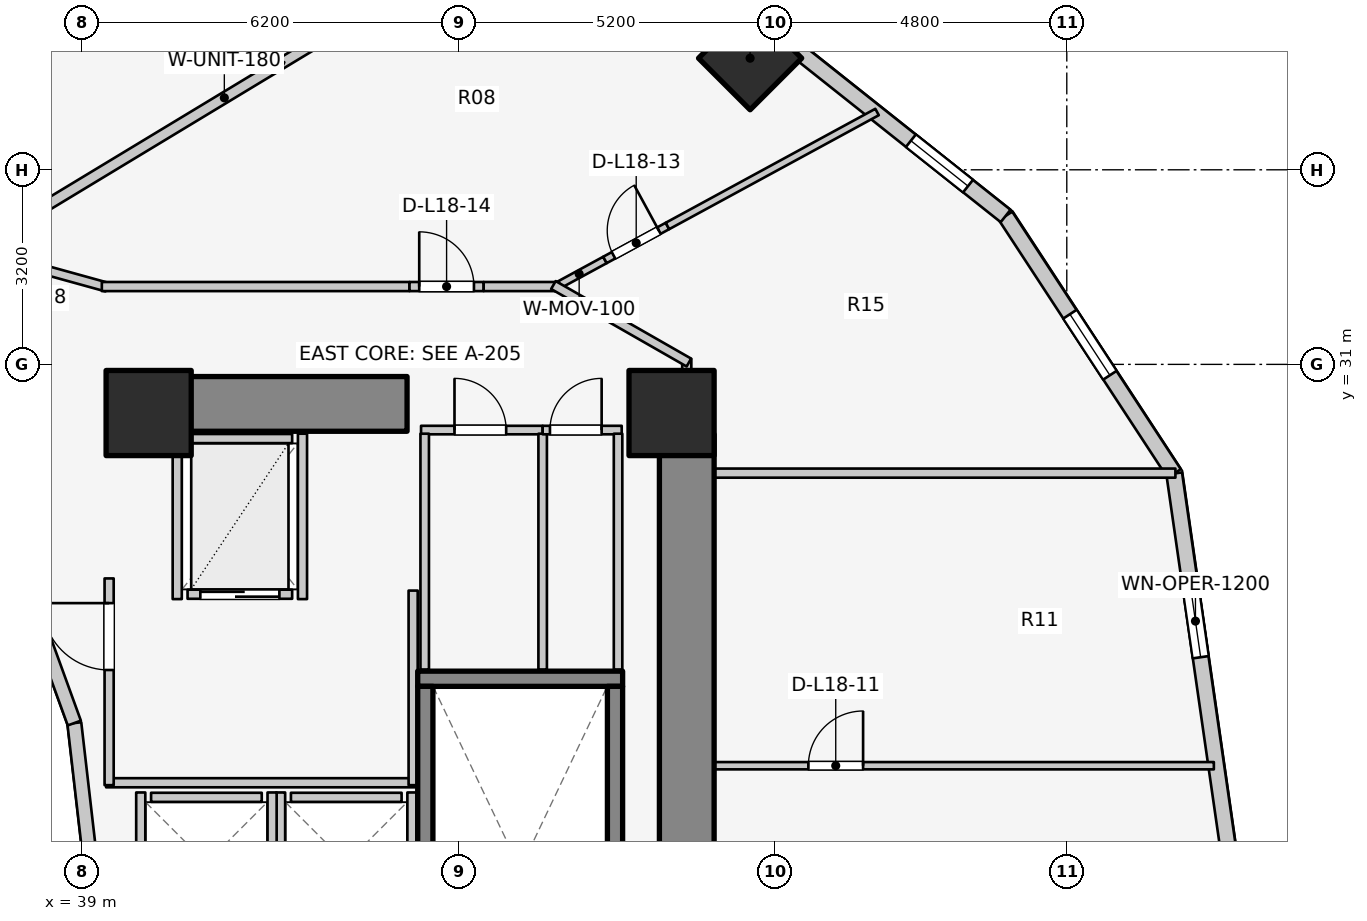
"""IFC4 building model, lengths in metres.
Left out: names, types, materials, properties, quantities, classifications, styles, units other than length and angle.
Written with IfcOpenShell. Run it as: python <this file> out.ifc"""

import sys

from ifc_helpers import new_model, si_unit, direction, frame, frame_2d, origin, origin_2d, place, context, subcontext, project, spatial, rectangle, extrude, element, fill, save


model = new_model("IFC4")
c1 = context("Model", 3, precision=1e-05, world=origin(), true_north=direction((0.0, 1.0)))
c2 = subcontext(c1, "Body", "Model", "MODEL_VIEW")
j1 = project(units=[si_unit("LENGTHUNIT", "METRE"), si_unit("PLANEANGLEUNIT", "RADIAN")], contexts=[c1])
p1 = place(None, origin())
s1 = spatial("IfcSite", under=j1, at=p1, CompositionType="ELEMENT")
p2 = place(p1, origin())
s2 = spatial("IfcBuilding", under=s1, at=p2, CompositionType="ELEMENT")
p3 = place(p2, frame((0.0, 0.0, 61.7)))
s3 = spatial("IfcBuildingStorey", under=s2, at=p3, CompositionType="ELEMENT", Elevation=61.7)
p4 = place(p3, frame((48.95, 17.05, 0.0), z_axis=(0.0, 0.0, 1.0), x_axis=(0.0, 1.0, 0.0)))
e1 = element("IfcWall", 1, at=p4, inside=s3, PredefinedType="SHEAR", context=c2, shape_type="SweptSolid", body=[
    extrude(rectangle(XDim=12.8, YDim=0.9, at=frame_2d((6.4, 0.0))), origin(), (0.0, 0.0, 1.0), 3.1),
])
p5 = place(p3, frame((39.85, 30.35, 0.0), z_axis=(0.0, 0.0, 1.0), x_axis=(1.0, 0.0, 0.0)))
e2 = element("IfcWall", 2, at=p5, inside=s3, PredefinedType="SHEAR", context=c2, shape_type="SweptSolid", body=[
    extrude(rectangle(XDim=4.5, YDim=0.9, at=frame_2d((2.25, 0.0))), origin(), (0.0, 0.0, 1.0), 3.1),
])
p6 = place(p3, frame((44.525, 25.83, 0.0), z_axis=(0.0, 0.0, 1.0), x_axis=(1.0, 0.0, 0.0)))
e3 = element("IfcWall", 3, at=p6, inside=s3, PredefinedType="SOLIDWALL", context=c2, shape_type="SweptSolid", body=[
    extrude(rectangle(XDim=3.37, YDim=0.25, at=frame_2d((1.685, 0.0))), origin(), (0.0, 0.0, 1.0), 3.1),
])
for number, where, z_axis, x_axis in (
    (4, (44.65, 17.895, 0.0), (0.0, 0.0, 1.0), (0.0, 1.0, 0.0)),
    (5, (47.77, 17.895, 0.0), (0.0, 0.0, 1.0), (0.0, 1.0, 0.0)),
):
    element("IfcWall", number, at=place(p3, frame(where, z_axis=z_axis, x_axis=x_axis)), inside=s3, PredefinedType="SOLIDWALL", context=c2, shape_type="SweptSolid", body=[
        extrude(rectangle(XDim=7.81, YDim=0.25, at=frame_2d((3.905, 0.0))), origin(), (0.0, 0.0, 1.0), 3.1),
    ])
for number, where, z_axis, x_axis in (
    (6, (48.7, 30.2, 0.0), (0.0, 0.0, 1.0), (1.0, 0.0, 0.0)),
    (7, (40.1, 30.2, 0.0), (0.0, 0.0, 1.0), (1.0, 0.0, 0.0)),
):
    element("IfcColumn", number, at=place(p3, frame(where, z_axis=z_axis, x_axis=x_axis)), inside=s3, PredefinedType="COLUMN", context=c2, shape_type="SweptSolid", body=[
        extrude(rectangle(XDim=1.4, YDim=1.4, at=origin_2d()), origin(), (0.0, 0.0, 1.0), 3.1),
    ])
p7 = place(p3, frame((49.992, 36.035, 0.0), z_axis=(0.0, 0.0, 1.0), x_axis=(0.707106781187, 0.707106781187, 0.0)))
e8 = element("IfcColumn", 8, at=p7, inside=s3, PredefinedType="COLUMN", context=c2, shape_type="SweptSolid", body=[
    extrude(rectangle(XDim=1.2, YDim=1.2, at=origin_2d()), origin(), (0.0, 0.0, 1.0), 3.1),
])
p8 = place(p3, frame((39.12, 23.0, 0.0), z_axis=(0.0, 0.0, 1.0), x_axis=(-0.114711713601, 0.993398823617, 0.0)))
e9 = element("IfcWall", 9, at=p8, inside=s3, PredefinedType="STANDARD", context=c2, shape_type="SweptSolid", body=[
    extrude(rectangle(XDim=2.115, YDim=0.23, at=frame_2d((1.058, 0.0))), origin(), (0.0, 0.0, 1.0), 2.56),
])
p9 = place(p3, frame((38.877, 25.102, 0.0), z_axis=(0.0, 0.0, 1.0), x_axis=(-0.341423187295, 0.93990968033, 0.0)))
e10 = element("IfcWall", 10, at=p9, inside=s3, PredefinedType="STANDARD", context=c2, shape_type="SweptSolid", body=[
    extrude(rectangle(XDim=2.084, YDim=0.23, at=frame_2d((1.042, 0.0))), origin(), (0.0, 0.0, 1.0), 2.56),
])
p10 = place(p3, frame((57.86, 23.0, 0.0), z_axis=(0.0, 0.0, 1.0), x_axis=(-0.142528001686, 0.989790770181, 0.0)))
e11 = element("IfcWall", 11, at=p10, inside=s3, PredefinedType="STANDARD", context=c2, shape_type="SweptSolid", body=[
    extrude(rectangle(XDim=6.269, YDim=0.26, at=frame_2d((3.135, 0.0))), origin(), (0.0, 0.0, 1.0), 2.57),
])
p11 = place(p10, frame((3.217, 0.0, 0.75)))
e12 = element("IfcOpeningElement", 12, at=p11, cuts=e11, PredefinedType="OPENING", context=c2, shape_type="SweptSolid", body=[
    extrude(rectangle(XDim=1.2, YDim=1.5, at=frame_2d((0.6, 0.75))), frame((0.0, 0.14, 0.0), z_axis=(0.0, -1.0, 0.0), x_axis=(1.0, 0.0, 0.0)), (0.0, 0.0, 1.0), 0.28),
])
p12 = place(p3, frame((56.967, 29.205, 0.0), z_axis=(0.0, 0.0, 1.0), x_axis=(-0.547702757047, 0.836672988642, 0.0)))
e13 = element("IfcWall", 13, at=p12, inside=s3, PredefinedType="STANDARD", context=c2, shape_type="SweptSolid", body=[
    extrude(rectangle(XDim=5.062, YDim=0.26, at=frame_2d((2.531, 0.0))), origin(), (0.0, 0.0, 1.0), 1.22),
])
p13 = place(p12, frame((1.931, 0.0, 0.15)))
e14 = element("IfcOpeningElement", 14, at=p13, cuts=e13, PredefinedType="OPENING", context=c2, shape_type="SweptSolid", body=[
    extrude(rectangle(XDim=1.2, YDim=0.9, at=frame_2d((0.6, 0.45))), frame((0.0, 0.14, 0.0), z_axis=(0.0, -1.0, 0.0), x_axis=(1.0, 0.0, 0.0)), (0.0, 0.0, 1.0), 0.28),
])
p14 = place(p3, frame((54.194, 33.441, 0.0), z_axis=(0.0, 0.0, 1.0), x_axis=(-0.783123133379, 0.621866672179, 0.0)))
e15 = element("IfcWall", 15, at=p14, inside=s3, PredefinedType="STANDARD", context=c2, shape_type="SweptSolid", body=[
    extrude(rectangle(XDim=4.839, YDim=0.26, at=frame_2d((2.419, 0.0))), origin(), (0.0, 0.0, 1.0), 1.22),
])
p15 = place(p14, frame((0.789, 0.0, 0.15)))
e16 = element("IfcOpeningElement", 16, at=p15, cuts=e15, PredefinedType="OPENING", context=c2, shape_type="SweptSolid", body=[
    extrude(rectangle(XDim=1.2, YDim=0.9, at=frame_2d((0.6, 0.45))), frame((0.0, 0.14, 0.0), z_axis=(0.0, -1.0, 0.0), x_axis=(1.0, 0.0, 0.0)), (0.0, 0.0, 1.0), 0.28),
])
p16 = place(p3, frame((42.44, 23.88, 0.0), z_axis=(0.0, 0.0, 1.0), x_axis=(1.0, 0.0, 0.0)))
e17 = element("IfcWall", 17, at=p16, inside=s3, PredefinedType="SOLIDWALL", context=c2, shape_type="SweptSolid", body=[
    extrude(rectangle(XDim=1.82, YDim=0.15, at=frame_2d((0.91, 0.0))), origin(), (0.0, 0.0, 1.0), 2.575),
])
for number, where, z_axis, x_axis in (
    (18, (42.27, 21.64, 0.0), (0.0, 0.0, 1.0), (0.0, 1.0, 0.0)),
    (19, (44.43, 21.64, 0.0), (0.0, 0.0, 1.0), (0.0, 1.0, 0.0)),
):
    element("IfcWall", number, at=place(p3, frame(where, z_axis=z_axis, x_axis=x_axis)), inside=s3, PredefinedType="SOLIDWALL", context=c2, shape_type="SweptSolid", body=[
        extrude(rectangle(XDim=2.32, YDim=0.15, at=frame_2d((1.16, 0.0))), origin(), (0.0, 0.0, 1.0), 2.575),
    ])
p17 = place(p3, frame((40.14, 23.88, 0.0), z_axis=(0.0, 0.0, 1.0), x_axis=(1.0, 0.0, 0.0)))
e20 = element("IfcWall", 20, at=p17, inside=s3, PredefinedType="SOLIDWALL", context=c2, shape_type="SweptSolid", body=[
    extrude(rectangle(XDim=1.82, YDim=0.15, at=frame_2d((0.91, 0.0))), origin(), (0.0, 0.0, 1.0), 2.12),
])
p18 = place(p3, frame((39.97, 21.64, 0.0), z_axis=(0.0, 0.0, 1.0), x_axis=(0.0, 1.0, 0.0)))
e21 = element("IfcWall", 21, at=p18, inside=s3, PredefinedType="SOLIDWALL", context=c2, shape_type="SweptSolid", body=[
    extrude(rectangle(XDim=2.32, YDim=0.15, at=frame_2d((1.16, 0.0))), origin(), (0.0, 0.0, 1.0), 2.12),
])
p19 = place(p3, frame((42.13, 21.64, 0.0), z_axis=(0.0, 0.0, 1.0), x_axis=(0.0, 1.0, 0.0)))
e22 = element("IfcWall", 22, at=p19, inside=s3, PredefinedType="SOLIDWALL", context=c2, shape_type="SweptSolid", body=[
    extrude(rectangle(XDim=2.32, YDim=0.15, at=frame_2d((1.16, 0.0))), origin(), (0.0, 0.0, 1.0), 2.575),
])
p20 = place(p3, frame((40.74, 27.22, 0.0), z_axis=(0.0, 0.0, 1.0), x_axis=(1.0, 0.0, 0.0)))
e23 = element("IfcWall", 23, at=p20, inside=s3, PredefinedType="SOLIDWALL", context=c2, shape_type="SweptSolid", body=[
    extrude(rectangle(XDim=1.72, YDim=0.15, at=frame_2d((0.86, 0.0))), origin(), (0.0, 0.0, 1.0), 2.575),
])
p21 = place(p20, frame((0.21, 0.0, 0.0)))
e24 = element("IfcOpeningElement", 24, at=p21, cuts=e23, PredefinedType="OPENING", context=c2, shape_type="SweptSolid", body=[
    extrude(rectangle(XDim=1.3, YDim=2.1, at=frame_2d((0.65, 1.05))), frame((0.0, 0.085, 0.0), z_axis=(0.0, -1.0, 0.0), x_axis=(1.0, 0.0, 0.0)), (0.0, 0.0, 1.0), 0.17),
])
p22 = place(p3, frame((40.74, 29.78, 0.0), z_axis=(0.0, 0.0, 1.0), x_axis=(1.0, 0.0, 0.0)))
e25 = element("IfcWall", 25, at=p22, inside=s3, PredefinedType="SOLIDWALL", context=c2, shape_type="SweptSolid", body=[
    extrude(rectangle(XDim=1.72, YDim=0.15, at=frame_2d((0.86, 0.0))), origin(), (0.0, 0.0, 1.0), 2.575),
])
for number, where, z_axis, x_axis in (
    (26, (40.57, 27.14, 0.0), (0.0, 0.0, 1.0), (0.0, 1.0, 0.0)),
    (27, (42.63, 27.14, 0.0), (0.0, 0.0, 1.0), (0.0, 1.0, 0.0)),
):
    element("IfcWall", number, at=place(p3, frame(where, z_axis=z_axis, x_axis=x_axis)), inside=s3, PredefinedType="SOLIDWALL", context=c2, shape_type="SweptSolid", body=[
        extrude(rectangle(XDim=2.72, YDim=0.15, at=frame_2d((1.36, 0.0))), origin(), (0.0, 0.0, 1.0), 2.575),
    ])
p23 = place(p3, frame((39.4, 24.12, 0.0), z_axis=(0.0, 0.0, 1.0), x_axis=(1.0, 0.0, 0.0)))
e28 = element("IfcWall", 28, at=p23, inside=s3, PredefinedType="PARTITIONING", context=c2, shape_type="SweptSolid", body=[
    extrude(rectangle(XDim=5.08, YDim=0.15, at=frame_2d((2.54, 0.0))), origin(), (0.0, 0.0, 1.0), 2.12),
])
p24 = place(p3, frame((44.45, 24.08, 0.0), z_axis=(0.0, 0.0, 1.0), x_axis=(0.0, 1.0, 0.0)))
e29 = element("IfcWall", 29, at=p24, inside=s3, PredefinedType="PARTITIONING", context=c2, shape_type="SweptSolid", body=[
    extrude(rectangle(XDim=3.2, YDim=0.15, at=frame_2d((1.6, 0.0))), origin(), (0.0, 0.0, 1.0), 2.575),
])
p25 = place(p3, frame((39.45, 24.08, 0.0), z_axis=(0.0, 0.0, 1.0), x_axis=(0.0, 1.0, 0.0)))
e30 = element("IfcWall", 30, at=p25, inside=s3, PredefinedType="PARTITIONING", context=c2, shape_type="SweptSolid", body=[
    extrude(rectangle(XDim=3.4, YDim=0.15, at=frame_2d((1.7, 0.0))), origin(), (0.0, 0.0, 1.0), 2.575),
])
p26 = place(p25, frame((1.894, 0.0, 0.0)))
e31 = element("IfcOpeningElement", 31, at=p26, cuts=e30, PredefinedType="OPENING", context=c2, shape_type="SweptSolid", body=[
    extrude(rectangle(XDim=1.1, YDim=2.1, at=frame_2d((0.55, 1.05))), frame((0.0, 0.085, 0.0), z_axis=(0.0, -1.0, 0.0), x_axis=(1.0, 0.0, 0.0)), (0.0, 0.0, 1.0), 0.17),
])
p27 = place(p3, frame((44.58, 29.92, 0.0), z_axis=(0.0, 0.0, 1.0), x_axis=(1.0, 0.0, 0.0)))
e32 = element("IfcWall", 32, at=p27, inside=s3, PredefinedType="PLUMBINGWALL", context=c2, shape_type="SweptSolid", body=[
    extrude(rectangle(XDim=2.0, YDim=0.14, at=frame_2d((1.0, 0.0))), origin(), (0.0, 0.0, 1.0), 2.575),
])
p28 = place(p27, frame((0.55, 0.0, 0.0)))
e33 = element("IfcOpeningElement", 33, at=p28, cuts=e32, PredefinedType="OPENING", context=c2, shape_type="SweptSolid", body=[
    extrude(rectangle(XDim=0.85, YDim=2.05, at=frame_2d((0.425, 1.025))), frame((0.0, 0.08, 0.0), z_axis=(0.0, -1.0, 0.0), x_axis=(1.0, 0.0, 0.0)), (0.0, 0.0, 1.0), 0.16),
])
for number, where, z_axis, x_axis in (
    (34, (44.64, 25.98, 0.0), (0.0, 0.0, 1.0), (0.0, 1.0, 0.0)),
    (35, (46.58, 25.98, 0.0), (0.0, 0.0, 1.0), (0.0, 1.0, 0.0)),
):
    element("IfcWall", number, at=place(p3, frame(where, z_axis=z_axis, x_axis=x_axis)), inside=s3, PredefinedType="PLUMBINGWALL", context=c2, shape_type="SweptSolid", body=[
        extrude(rectangle(XDim=3.88, YDim=0.14, at=frame_2d((1.94, 0.0))), origin(), (0.0, 0.0, 1.0), 2.575),
    ])
p29 = place(p3, frame((46.58, 29.92, 0.0), z_axis=(0.0, 0.0, 1.0), x_axis=(1.0, 0.0, 0.0)))
e36 = element("IfcWall", 36, at=p29, inside=s3, PredefinedType="PLUMBINGWALL", context=c2, shape_type="SweptSolid", body=[
    extrude(rectangle(XDim=1.3, YDim=0.14, at=frame_2d((0.65, 0.0))), origin(), (0.0, 0.0, 1.0), 2.575),
])
p30 = place(p29, frame((0.12, 0.0, 0.0)))
e37 = element("IfcOpeningElement", 37, at=p30, cuts=e36, PredefinedType="OPENING", context=c2, shape_type="SweptSolid", body=[
    extrude(rectangle(XDim=0.85, YDim=2.05, at=frame_2d((0.425, 1.025))), frame((0.0, 0.08, 0.0), z_axis=(0.0, -1.0, 0.0), x_axis=(1.0, 0.0, 0.0)), (0.0, 0.0, 1.0), 0.16),
])
p31 = place(p3, frame((47.82, 25.98, 0.0), z_axis=(0.0, 0.0, 1.0), x_axis=(0.0, 1.0, 0.0)))
e38 = element("IfcWall", 38, at=p31, inside=s3, PredefinedType="PLUMBINGWALL", context=c2, shape_type="SweptSolid", body=[
    extrude(rectangle(XDim=3.88, YDim=0.14, at=frame_2d((1.94, 0.0))), origin(), (0.0, 0.0, 1.0), 2.575),
])
p32 = place(p3, frame((48.95, 29.212, 0.0), z_axis=(0.0, 0.0, 1.0), x_axis=(1.0, 0.0, 0.0)))
e39 = element("IfcWall", 39, at=p32, inside=s3, PredefinedType="PARTITIONING", context=c2, shape_type="SweptSolid", body=[
    extrude(rectangle(XDim=8.036, YDim=0.15, at=frame_2d((4.018, 0.0))), origin(), (0.0, 0.0, 1.0), 2.575),
])
p33 = place(p3, frame((48.95, 24.4, 0.0), z_axis=(0.0, 0.0, 1.0), x_axis=(1.0, 0.0, 0.0)))
e40 = element("IfcWall", 40, at=p33, inside=s3, PredefinedType="MOVABLE", context=c2, shape_type="SweptSolid", body=[
    extrude(rectangle(XDim=8.669, YDim=0.12, at=frame_2d((4.334, 0.0))), origin(), (0.0, 0.0, 1.0), 2.575),
])
p34 = place(p33, frame((2.0, 0.0, 0.0)))
e41 = element("IfcOpeningElement", 41, at=p34, cuts=e40, PredefinedType="OPENING", context=c2, shape_type="SweptSolid", body=[
    extrude(rectangle(XDim=0.9, YDim=2.1, at=frame_2d((0.45, 1.05))), frame((0.0, 0.07, 0.0), z_axis=(0.0, -1.0, 0.0), x_axis=(1.0, 0.0, 0.0)), (0.0, 0.0, 1.0), 0.14),
])
p35 = place(p3, frame((48.95, 29.8, 0.0), z_axis=(0.0, 0.0, 1.0), x_axis=(0.0, 1.0, 0.0)))
e42 = element("IfcWall", 42, at=p35, inside=s3, PredefinedType="PARTITIONING", context=c2, shape_type="SweptSolid", body=[
    extrude(rectangle(XDim=1.29, YDim=0.15, at=frame_2d((0.645, 0.0))), origin(), (0.0, 0.0, 1.0), 1.22),
])
p36 = place(p3, frame((46.756, 32.256, 0.0), z_axis=(0.0, 0.0, 1.0), x_axis=(0.878580692024, 0.477593935894, 0.0)))
e43 = element("IfcWall", 43, at=p36, inside=s3, PredefinedType="MOVABLE", context=c2, shape_type="SweptSolid", body=[
    extrude(rectangle(XDim=0.966, YDim=0.12, at=frame_2d((0.483, 0.0))), origin(), (0.0, 0.0, 1.0), 2.575),
])
p37 = place(p3, frame((47.604, 32.717, 0.0), z_axis=(0.0, 0.0, 1.0), x_axis=(0.878540750178, 0.4776674055, 0.0)))
e44 = element("IfcWall", 44, at=p37, inside=s3, PredefinedType="MOVABLE", context=c2, shape_type="SweptSolid", body=[
    extrude(rectangle(XDim=1.17, YDim=0.12, at=frame_2d((0.585, 0.0))), origin(), (0.0, 0.0, 1.0), 2.11),
])
p38 = place(p37, frame((0.16, 0.0, 0.0)))
e45 = element("IfcOpeningElement", 45, at=p38, cuts=e44, PredefinedType="OPENING", context=c2, shape_type="SweptSolid", body=[
    extrude(rectangle(XDim=0.85, YDim=2.05, at=frame_2d((0.425, 1.025))), frame((0.0, 0.07, 0.0), z_axis=(0.0, -1.0, 0.0), x_axis=(1.0, 0.0, 0.0)), (0.0, 0.0, 1.0), 0.14),
])
p39 = place(p3, frame((48.632, 33.276, 0.0), z_axis=(0.0, 0.0, 1.0), x_axis=(0.878543913196, 0.477661587932, 0.0)))
e46 = element("IfcWall", 46, at=p39, inside=s3, PredefinedType="MOVABLE", context=c2, shape_type="SweptSolid", body=[
    extrude(rectangle(XDim=3.924, YDim=0.12, at=frame_2d((1.962, 0.0))), origin(), (0.0, 0.0, 1.0), 1.22),
])
p40 = place(p3, frame((37.258, 32.867, 0.0), z_axis=(0.0, 0.0, 1.0), x_axis=(0.963833843713, -0.266503886865, 0.0)))
e47 = element("IfcWall", 47, at=p40, inside=s3, PredefinedType="PARTITIONING", context=c2, shape_type="SweptSolid", body=[
    extrude(rectangle(XDim=2.232, YDim=0.15, at=frame_2d((1.116, 0.0))), origin(), (0.0, 0.0, 1.0), 1.22),
])
p41 = place(p3, frame((39.33, 32.28, 0.0), z_axis=(0.0, 0.0, 1.0), x_axis=(1.0, 0.0, 0.0)))
e48 = element("IfcWall", 48, at=p41, inside=s3, PredefinedType="PARTITIONING", context=c2, shape_type="SweptSolid", body=[
    extrude(rectangle(XDim=5.06, YDim=0.15, at=frame_2d((2.53, 0.0))), origin(), (0.0, 0.0, 1.0), 1.22),
])
p42 = place(p3, frame((44.39, 32.28, 0.0), z_axis=(0.0, 0.0, 1.0), x_axis=(1.0, 0.0, 0.0)))
e49 = element("IfcWall", 49, at=p42, inside=s3, PredefinedType="PARTITIONING", context=c2, shape_type="SweptSolid", body=[
    extrude(rectangle(XDim=1.22, YDim=0.15, at=frame_2d((0.61, 0.0))), origin(), (0.0, 0.0, 1.0), 2.16),
])
p43 = place(p42, frame((0.16, 0.0, 0.0)))
e50 = element("IfcOpeningElement", 50, at=p43, cuts=e49, PredefinedType="OPENING", context=c2, shape_type="SweptSolid", body=[
    extrude(rectangle(XDim=0.9, YDim=2.1, at=frame_2d((0.45, 1.05))), frame((0.0, 0.085, 0.0), z_axis=(0.0, -1.0, 0.0), x_axis=(1.0, 0.0, 0.0)), (0.0, 0.0, 1.0), 0.17),
])
p44 = place(p3, frame((45.61, 32.28, 0.0), z_axis=(0.0, 0.0, 1.0), x_axis=(1.0, 0.0, 0.0)))
e51 = element("IfcWall", 51, at=p44, inside=s3, PredefinedType="PARTITIONING", context=c2, shape_type="SweptSolid", body=[
    extrude(rectangle(XDim=1.24, YDim=0.15, at=frame_2d((0.62, 0.0))), origin(), (0.0, 0.0, 1.0), 2.575),
])
p45 = place(p3, frame((46.757, 32.305, 0.0), z_axis=(0.0, 0.0, 1.0), x_axis=(0.867991349648, -0.496579315857, 0.0)))
e52 = element("IfcWall", 52, at=p45, inside=s3, PredefinedType="PARTITIONING", context=c2, shape_type="SweptSolid", body=[
    extrude(rectangle(XDim=2.567, YDim=0.15, at=frame_2d((1.283, 0.0))), origin(), (0.0, 0.0, 1.0), 1.22),
])
p46 = place(p3, frame((37.252, 32.91, 0.0), z_axis=(0.0, 0.0, 1.0), x_axis=(0.855817136021, 0.517278483694, 0.0)))
e53 = element("IfcWall", 53, at=p46, inside=s3, PredefinedType="PARTITIONING", context=c2, shape_type="SweptSolid", body=[
    extrude(rectangle(XDim=9.564, YDim=0.18, at=frame_2d((4.782, 0.0))), origin(), (0.0, 0.0, 1.0), 1.22),
])
p47 = place(p3, frame((42.305, 35.914, 0.0), z_axis=(0.0, 0.0, 1.0), x_axis=(-0.891749407737, 0.452529550195, 0.0)))
e54 = element("IfcWall", 54, at=p47, inside=s3, PredefinedType="MOVABLE", context=c2, shape_type="SweptSolid", body=[
    extrude(rectangle(XDim=6.09, YDim=0.12, at=frame_2d((3.045, 0.0))), origin(), (0.0, 0.0, 1.0), 1.22),
])
p48 = place(p11, origin())
e55 = element("IfcWindow", 55, at=p48, inside=s3, PartitioningType="SINGLE_PANEL", PredefinedType="WINDOW", context=c2, shape_type="SweptSolid", body=[
    extrude(rectangle(XDim=1.2, YDim=1.5, at=frame_2d((0.6, 0.75))), frame((0.0, 0.03, 0.0), z_axis=(0.0, -1.0, 0.0), x_axis=(1.0, 0.0, 0.0)), (0.0, 0.0, 1.0), 0.06),
])
fill(e12, e55)
p49 = place(p13, origin())
e56 = element("IfcWindow", 56, at=p49, inside=s3, PartitioningType="SINGLE_PANEL", PredefinedType="WINDOW", context=c2, shape_type="SweptSolid", body=[
    extrude(rectangle(XDim=1.2, YDim=0.9, at=frame_2d((0.6, 0.45))), frame((0.0, 0.03, 0.0), z_axis=(0.0, -1.0, 0.0), x_axis=(1.0, 0.0, 0.0)), (0.0, 0.0, 1.0), 0.06),
])
fill(e14, e56)
p50 = place(p15, origin())
e57 = element("IfcWindow", 57, at=p50, inside=s3, PartitioningType="SINGLE_PANEL", PredefinedType="WINDOW", context=c2, shape_type="SweptSolid", body=[
    extrude(rectangle(XDim=1.2, YDim=0.9, at=frame_2d((0.6, 0.45))), frame((0.0, 0.03, 0.0), z_axis=(0.0, -1.0, 0.0), x_axis=(1.0, 0.0, 0.0)), (0.0, 0.0, 1.0), 0.06),
])
fill(e16, e57)
p51 = place(p21, origin())
e58 = element("IfcDoor", 58, at=p51, inside=s3, OperationType="DOUBLE_DOOR_SLIDING", PredefinedType="DOOR", context=c2, shape_type="SweptSolid", body=[
    extrude(rectangle(XDim=1.3, YDim=2.1, at=frame_2d((0.65, 1.05))), frame((0.0, 0.025, 0.0), z_axis=(0.0, -1.0, 0.0), x_axis=(1.0, 0.0, 0.0)), (0.0, 0.0, 1.0), 0.05),
])
fill(e24, e58)
p52 = place(p26, origin())
e59 = element("IfcDoor", 59, at=p52, inside=s3, OperationType="SINGLE_SWING_RIGHT", PredefinedType="DOOR", context=c2, shape_type="SweptSolid", body=[
    extrude(rectangle(XDim=1.1, YDim=2.1, at=frame_2d((0.55, 1.05))), frame((0.0, 0.025, 0.0), z_axis=(0.0, -1.0, 0.0), x_axis=(1.0, 0.0, 0.0)), (0.0, 0.0, 1.0), 0.05),
])
fill(e31, e59)
p53 = place(p28, origin())
e60 = element("IfcDoor", 60, at=p53, inside=s3, OperationType="SINGLE_SWING_LEFT", PredefinedType="DOOR", context=c2, shape_type="SweptSolid", body=[
    extrude(rectangle(XDim=0.85, YDim=2.05, at=frame_2d((0.425, 1.025))), frame((0.0, 0.025, 0.0), z_axis=(0.0, -1.0, 0.0), x_axis=(1.0, 0.0, 0.0)), (0.0, 0.0, 1.0), 0.05),
])
fill(e33, e60)
p54 = place(p30, origin())
e61 = element("IfcDoor", 61, at=p54, inside=s3, OperationType="SINGLE_SWING_RIGHT", PredefinedType="DOOR", context=c2, shape_type="SweptSolid", body=[
    extrude(rectangle(XDim=0.85, YDim=2.05, at=frame_2d((0.425, 1.025))), frame((0.0, 0.025, 0.0), z_axis=(0.0, -1.0, 0.0), x_axis=(1.0, 0.0, 0.0)), (0.0, 0.0, 1.0), 0.05),
])
fill(e37, e61)
p55 = place(p34, origin())
e62 = element("IfcDoor", 62, at=p55, inside=s3, OperationType="SINGLE_SWING_RIGHT", PredefinedType="DOOR", context=c2, shape_type="SweptSolid", body=[
    extrude(rectangle(XDim=0.9, YDim=2.1, at=frame_2d((0.45, 1.05))), frame((0.0, 0.025, 0.0), z_axis=(0.0, -1.0, 0.0), x_axis=(1.0, 0.0, 0.0)), (0.0, 0.0, 1.0), 0.05),
])
fill(e41, e62)
p56 = place(p38, origin())
e63 = element("IfcDoor", 63, at=p56, inside=s3, OperationType="SINGLE_SWING_RIGHT", PredefinedType="DOOR", context=c2, shape_type="SweptSolid", body=[
    extrude(rectangle(XDim=0.85, YDim=2.05, at=frame_2d((0.425, 1.025))), frame((0.0, 0.025, 0.0), z_axis=(0.0, -1.0, 0.0), x_axis=(1.0, 0.0, 0.0)), (0.0, 0.0, 1.0), 0.05),
])
fill(e45, e63)
p57 = place(p43, origin())
e64 = element("IfcDoor", 64, at=p57, inside=s3, OperationType="SINGLE_SWING_LEFT", PredefinedType="DOOR", context=c2, shape_type="SweptSolid", body=[
    extrude(rectangle(XDim=0.9, YDim=2.1, at=frame_2d((0.45, 1.05))), frame((0.0, 0.025, 0.0), z_axis=(0.0, -1.0, 0.0), x_axis=(1.0, 0.0, 0.0)), (0.0, 0.0, 1.0), 0.05),
])
fill(e50, e64)
save(model, sys.argv[1])
